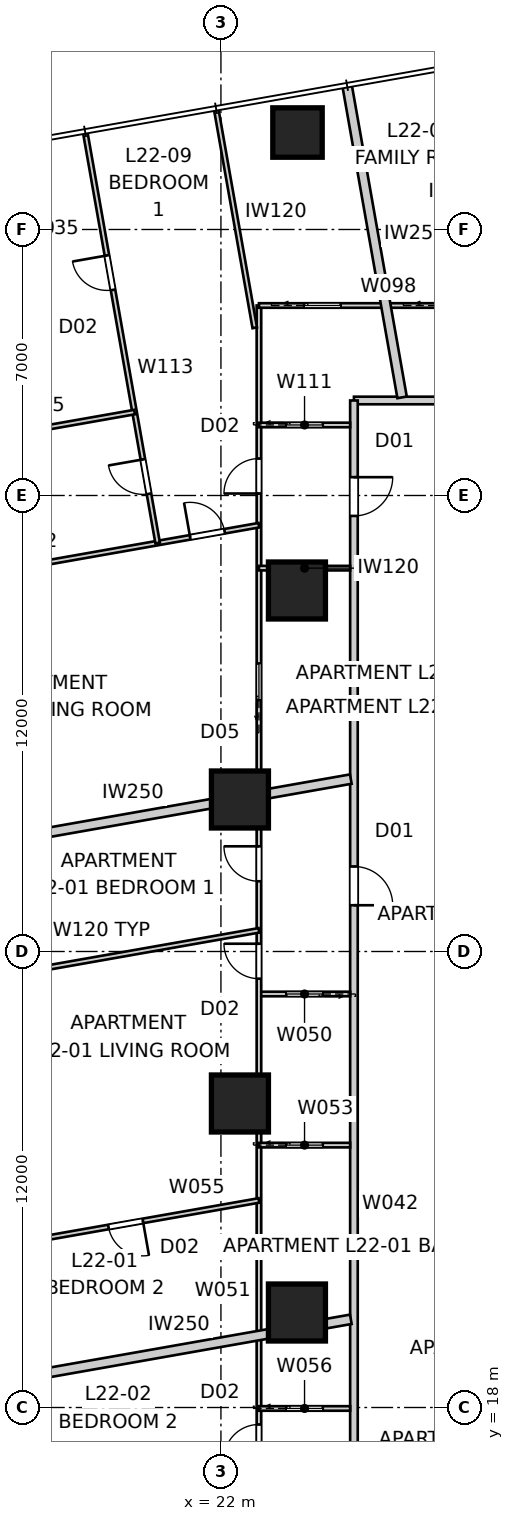
"""IFC4 building model, lengths in metres.
Left out: names, types, materials, properties, quantities, classifications, styles, units other than length and angle.
Written with IfcOpenShell. Run it as: python <this file> out.ifc"""

import sys

from ifc_helpers import new_model, si_unit, direction, frame, frame_2d, origin, origin_2d, place, context, subcontext, project, spatial, rectangle, extrude, element, fill, save


model = new_model("IFC4")
c1 = context("Model", 3, precision=1e-05, world=origin(), true_north=direction((0.0, 1.0)))
c2 = subcontext(c1, "Body", "Model", "MODEL_VIEW")
j1 = project(units=[si_unit("LENGTHUNIT", "METRE"), si_unit("PLANEANGLEUNIT", "RADIAN")], contexts=[c1])
p1 = place(None, origin())
s1 = spatial("IfcSite", under=j1, at=p1, CompositionType="ELEMENT")
p2 = place(p1, origin())
s2 = spatial("IfcBuilding", under=s1, at=p2, CompositionType="ELEMENT")
p3 = place(p2, frame((0.0, 0.0, 82.8)))
s3 = spatial("IfcBuildingStorey", under=s2, at=p3, CompositionType="ELEMENT", Elevation=82.8)
p4 = place(p3, frame((24.015, 51.552, 0.0), z_axis=(0.0, 0.0, 1.0), x_axis=(1.0, 0.0, 0.0)))
e1 = element("IfcColumn", 1, at=p4, inside=s3, PredefinedType="COLUMN", context=c2, shape_type="SweptSolid", body=[
    extrude(rectangle(XDim=1.3, YDim=1.3, at=origin_2d()), origin(), (0.0, 0.0, 1.0), 3.4),
])
for number, where, z_axis, x_axis in (
    (2, (24.0, 39.5, 0.0), (0.0, 0.0, 1.0), (1.0, 0.0, 0.0)),
    (3, (22.5, 34.0, 0.0), (0.0, 0.0, 1.0), (1.0, 0.0, 0.0)),
    (4, (22.5, 26.0, 0.0), (0.0, 0.0, 1.0), (1.0, 0.0, 0.0)),
    (5, (24.0, 20.5, 0.0), (0.0, 0.0, 1.0), (1.0, 0.0, 0.0)),
):
    element("IfcColumn", number, at=place(p3, frame(where, z_axis=z_axis, x_axis=x_axis)), inside=s3, PredefinedType="COLUMN", context=c2, shape_type="SweptSolid", body=[
        extrude(rectangle(XDim=1.5, YDim=1.5, at=origin_2d()), origin(), (0.0, 0.0, 1.0), 3.4),
    ])
p5 = place(p3, frame((54.5, 44.5, 0.0), z_axis=(0.0, 0.0, 1.0), x_axis=(-1.0, 0.0, 0.0)))
e6 = element("IfcWall", 6, at=p5, inside=s3, PredefinedType="PARTITIONING", context=c2, shape_type="SweptSolid", body=[
    extrude(rectangle(XDim=29.0, YDim=0.2, at=frame_2d((14.5, 0.0))), origin(), (0.0, 0.0, 1.0), 3.25),
])
p6 = place(p5, frame((10.129, 0.0, 0.0)))
e7 = element("IfcOpeningElement", 7, at=p6, cuts=e6, PredefinedType="OPENING", context=c2, shape_type="SweptSolid", body=[
    extrude(rectangle(XDim=1.02, YDim=2.34, at=frame_2d((0.51, 1.17))), frame((0.0, 0.11, 0.0), z_axis=(0.0, -1.0, 0.0), x_axis=(1.0, 0.0, 0.0)), (0.0, 0.0, 1.0), 0.22),
])
p7 = place(p5, frame((3.065, 0.0, 0.0)))
e8 = element("IfcOpeningElement", 8, at=p7, cuts=e6, PredefinedType="OPENING", context=c2, shape_type="SweptSolid", body=[
    extrude(rectangle(XDim=1.02, YDim=2.1, at=frame_2d((0.51, 1.05))), frame((0.0, 0.11, 0.0), z_axis=(0.0, -1.0, 0.0), x_axis=(1.0, 0.0, 0.0)), (0.0, 0.0, 1.0), 0.22),
])
p8 = place(p3, frame((25.5, 44.5, 0.0), z_axis=(0.0, 0.0, 1.0), x_axis=(0.0, -1.0, 0.0)))
e9 = element("IfcWall", 9, at=p8, inside=s3, PredefinedType="PARTITIONING", context=c2, shape_type="SweptSolid", body=[
    extrude(rectangle(XDim=29.0, YDim=0.2, at=frame_2d((14.5, 0.0))), origin(), (0.0, 0.0, 1.0), 3.25),
])
p9 = place(p8, frame((12.263, 0.0, 0.0)))
e10 = element("IfcOpeningElement", 10, at=p9, cuts=e9, PredefinedType="OPENING", context=c2, shape_type="SweptSolid", body=[
    extrude(rectangle(XDim=1.02, YDim=2.34, at=frame_2d((0.51, 1.17))), frame((0.0, 0.11, 0.0), z_axis=(0.0, -1.0, 0.0), x_axis=(1.0, 0.0, 0.0)), (0.0, 0.0, 1.0), 0.22),
])
p10 = place(p8, frame((2.018, 0.0, 0.0)))
e11 = element("IfcOpeningElement", 11, at=p10, cuts=e9, PredefinedType="OPENING", context=c2, shape_type="SweptSolid", body=[
    extrude(rectangle(XDim=1.02, YDim=2.34, at=frame_2d((0.51, 1.17))), frame((0.0, 0.11, 0.0), z_axis=(0.0, -1.0, 0.0), x_axis=(1.0, 0.0, 0.0)), (0.0, 0.0, 1.0), 0.22),
])
p11 = place(p3, frame((25.318, 52.797, 0.0), z_axis=(0.0, 0.0, 1.0), x_axis=(0.173651756605, -0.984807121942, 0.0)))
e12 = element("IfcWall", 12, at=p11, inside=s3, PredefinedType="PARTITIONING", context=c2, shape_type="SweptSolid", body=[
    extrude(rectangle(XDim=8.341, YDim=0.25, at=frame_2d((4.171, 0.0))), origin(), (0.0, 0.0, 1.0), 3.25),
])
p12 = place(p3, frame((14.164, 32.552, 0.0), z_axis=(0.0, 0.0, 1.0), x_axis=(0.98481000304, 0.173635416642, 0.0)))
e13 = element("IfcWall", 13, at=p12, inside=s3, PredefinedType="PARTITIONING", context=c2, shape_type="SweptSolid", body=[
    extrude(rectangle(XDim=11.427, YDim=0.25, at=frame_2d((5.713, 0.0))), origin(), (0.0, 0.0, 1.0), 3.25),
])
p13 = place(p3, frame((16.595, 18.765, 0.0), z_axis=(0.0, 0.0, 1.0), x_axis=(0.984806596137, 0.173654738504, 0.0)))
e14 = element("IfcWall", 14, at=p13, inside=s3, PredefinedType="PARTITIONING", context=c2, shape_type="SweptSolid", body=[
    extrude(rectangle(XDim=8.958, YDim=0.25, at=frame_2d((4.479, 0.0))), origin(), (0.0, 0.0, 1.0), 3.25),
])
p14 = place(p3, frame((25.4, 28.882, 0.0), z_axis=(0.0, 0.0, 1.0), x_axis=(-1.0, 0.0, 0.0)))
e15 = element("IfcWall", 15, at=p14, inside=s3, PredefinedType="PARTITIONING", context=c2, shape_type="SweptSolid", body=[
    extrude(rectangle(XDim=2.4, YDim=0.12, at=frame_2d((1.2, 0.0))), origin(), (0.0, 0.0, 1.0), 3.25),
])
p15 = place(p14, frame((0.72, 0.0, 0.0)))
e16 = element("IfcOpeningElement", 16, at=p15, cuts=e15, PredefinedType="OPENING", context=c2, shape_type="SweptSolid", body=[
    extrude(rectangle(XDim=0.96, YDim=2.1, at=frame_2d((0.48, 1.05))), frame((0.0, 0.07, 0.0), z_axis=(0.0, -1.0, 0.0), x_axis=(1.0, 0.0, 0.0)), (0.0, 0.0, 1.0), 0.14),
])
p16 = place(p3, frame((23.0, 13.0, 0.0), z_axis=(0.0, 0.0, 1.0), x_axis=(0.0, 1.0, 0.0)))
e17 = element("IfcWall", 17, at=p16, inside=s3, PredefinedType="PARTITIONING", context=c2, shape_type="SweptSolid", body=[
    extrude(rectangle(XDim=34.0, YDim=0.12, at=frame_2d((17.0, 0.0))), origin(), (0.0, 0.0, 1.0), 2.55),
])
p17 = place(p16, frame((18.848, 0.0, 0.0)))
e18 = element("IfcOpeningElement", 18, at=p17, cuts=e17, PredefinedType="OPENING", context=c2, shape_type="SweptSolid", body=[
    extrude(rectangle(XDim=0.92, YDim=2.34, at=frame_2d((0.46, 1.17))), frame((0.0, 0.07, 0.0), z_axis=(0.0, -1.0, 0.0), x_axis=(1.0, 0.0, 0.0)), (0.0, 0.0, 1.0), 0.14),
])
p18 = place(p16, frame((16.284, 0.0, 0.0)))
e19 = element("IfcOpeningElement", 19, at=p18, cuts=e17, PredefinedType="OPENING", context=c2, shape_type="SweptSolid", body=[
    extrude(rectangle(XDim=0.92, YDim=2.34, at=frame_2d((0.46, 1.17))), frame((0.0, 0.07, 0.0), z_axis=(0.0, -1.0, 0.0), x_axis=(1.0, 0.0, 0.0)), (0.0, 0.0, 1.0), 0.14),
])
p19 = place(p16, frame((29.052, 0.0, 0.0)))
e20 = element("IfcOpeningElement", 20, at=p19, cuts=e17, PredefinedType="OPENING", context=c2, shape_type="SweptSolid", body=[
    extrude(rectangle(XDim=0.92, YDim=2.34, at=frame_2d((0.46, 1.17))), frame((0.0, 0.07, 0.0), z_axis=(0.0, -1.0, 0.0), x_axis=(1.0, 0.0, 0.0)), (0.0, 0.0, 1.0), 0.14),
])
p20 = place(p16, frame((1.196, 0.0, 0.0)))
e21 = element("IfcOpeningElement", 21, at=p20, cuts=e17, PredefinedType="OPENING", context=c2, shape_type="SweptSolid", body=[
    extrude(rectangle(XDim=0.92, YDim=2.34, at=frame_2d((0.46, 1.17))), frame((0.0, 0.07, 0.0), z_axis=(0.0, -1.0, 0.0), x_axis=(1.0, 0.0, 0.0)), (0.0, 0.0, 1.0), 0.14),
])
p21 = place(p16, frame((3.633, 0.0, 0.0)))
e22 = element("IfcOpeningElement", 22, at=p21, cuts=e17, PredefinedType="OPENING", context=c2, shape_type="SweptSolid", body=[
    extrude(rectangle(XDim=0.92, YDim=2.34, at=frame_2d((0.46, 1.17))), frame((0.0, 0.07, 0.0), z_axis=(0.0, -1.0, 0.0), x_axis=(1.0, 0.0, 0.0)), (0.0, 0.0, 1.0), 0.14),
])
p22 = place(p16, frame((23.619, 0.0, 0.0)))
e23 = element("IfcOpeningElement", 23, at=p22, cuts=e17, PredefinedType="OPENING", context=c2, shape_type="SweptSolid", body=[
    extrude(rectangle(XDim=0.96, YDim=2.1, at=frame_2d((0.48, 1.05))), frame((0.0, 0.07, 0.0), z_axis=(0.0, -1.0, 0.0), x_axis=(1.0, 0.0, 0.0)), (0.0, 0.0, 1.0), 0.14),
])
p23 = place(p3, frame((23.0, 24.905, 0.0), z_axis=(0.0, 0.0, 1.0), x_axis=(1.0, 0.0, 0.0)))
e24 = element("IfcWall", 24, at=p23, inside=s3, PredefinedType="PARTITIONING", context=c2, shape_type="SweptSolid", body=[
    extrude(rectangle(XDim=2.4, YDim=0.12, at=frame_2d((1.2, 0.0))), origin(), (0.0, 0.0, 1.0), 3.25),
])
p24 = place(p23, frame((0.72, 0.0, 0.0)))
e25 = element("IfcOpeningElement", 25, at=p24, cuts=e24, PredefinedType="OPENING", context=c2, shape_type="SweptSolid", body=[
    extrude(rectangle(XDim=0.96, YDim=2.1, at=frame_2d((0.48, 1.05))), frame((0.0, 0.07, 0.0), z_axis=(0.0, -1.0, 0.0), x_axis=(1.0, 0.0, 0.0)), (0.0, 0.0, 1.0), 0.14),
])
p25 = place(p3, frame((14.812, 29.113, 0.0), z_axis=(0.0, 0.0, 1.0), x_axis=(0.984807787824, 0.173647980238, 0.0)))
e26 = element("IfcWall", 26, at=p25, inside=s3, PredefinedType="PARTITIONING", context=c2, shape_type="SweptSolid", body=[
    extrude(rectangle(XDim=8.315, YDim=0.12, at=frame_2d((4.157, 0.0))), origin(), (0.0, 0.0, 1.0), 3.25),
])
p26 = place(p3, frame((23.0, 23.448, 0.0), z_axis=(0.0, 0.0, 1.0), x_axis=(-0.984809234282, -0.173639776761, 0.0)))
e27 = element("IfcWall", 27, at=p26, inside=s3, PredefinedType="PARTITIONING", context=c2, shape_type="SweptSolid", body=[
    extrude(rectangle(XDim=7.081, YDim=0.12, at=frame_2d((3.541, 0.0))), origin(), (0.0, 0.0, 1.0), 3.25),
])
p27 = place(p26, frame((3.1, 0.0, 0.0)))
e28 = element("IfcOpeningElement", 28, at=p27, cuts=e27, PredefinedType="OPENING", context=c2, shape_type="SweptSolid", body=[
    extrude(rectangle(XDim=0.92, YDim=2.34, at=frame_2d((0.46, 1.17))), frame((0.0, 0.07, 0.0), z_axis=(0.0, -1.0, 0.0), x_axis=(1.0, 0.0, 0.0)), (0.0, 0.0, 1.0), 0.14),
])
p28 = place(p3, frame((23.0, 17.975, 0.0), z_axis=(0.0, 0.0, 1.0), x_axis=(1.0, 0.0, 0.0)))
e29 = element("IfcWall", 29, at=p28, inside=s3, PredefinedType="PARTITIONING", context=c2, shape_type="SweptSolid", body=[
    extrude(rectangle(XDim=2.4, YDim=0.12, at=frame_2d((1.2, 0.0))), origin(), (0.0, 0.0, 1.0), 3.25),
])
p29 = place(p28, frame((0.72, 0.0, 0.0)))
e30 = element("IfcOpeningElement", 30, at=p29, cuts=e29, PredefinedType="OPENING", context=c2, shape_type="SweptSolid", body=[
    extrude(rectangle(XDim=0.96, YDim=2.1, at=frame_2d((0.48, 1.05))), frame((0.0, 0.07, 0.0), z_axis=(0.0, -1.0, 0.0), x_axis=(1.0, 0.0, 0.0)), (0.0, 0.0, 1.0), 0.14),
])
p30 = place(p3, frame((23.0, 47.0, 0.0), z_axis=(0.0, 0.0, 1.0), x_axis=(1.0, 0.0, 0.0)))
e31 = element("IfcWall", 31, at=p30, inside=s3, PredefinedType="PARTITIONING", context=c2, shape_type="SweptSolid", body=[
    extrude(rectangle(XDim=24.771, YDim=0.12, at=frame_2d((12.386, 0.0))), origin(), (0.0, 0.0, 1.0), 2.55),
])
p31 = place(p30, frame((21.825, 0.0, 0.0)))
e32 = element("IfcOpeningElement", 32, at=p31, cuts=e31, PredefinedType="OPENING", context=c2, shape_type="SweptSolid", body=[
    extrude(rectangle(XDim=0.92, YDim=2.34, at=frame_2d((0.46, 1.17))), frame((0.0, 0.07, 0.0), z_axis=(0.0, -1.0, 0.0), x_axis=(1.0, 0.0, 0.0)), (0.0, 0.0, 1.0), 0.14),
])
p32 = place(p30, frame((11.135, 0.0, 0.0)))
e33 = element("IfcOpeningElement", 33, at=p32, cuts=e31, PredefinedType="OPENING", context=c2, shape_type="SweptSolid", body=[
    extrude(rectangle(XDim=0.96, YDim=2.1, at=frame_2d((0.48, 1.05))), frame((0.0, 0.07, 0.0), z_axis=(0.0, -1.0, 0.0), x_axis=(1.0, 0.0, 0.0)), (0.0, 0.0, 1.0), 0.14),
])
p33 = place(p30, frame((1.19, 0.0, 0.0)))
e34 = element("IfcOpeningElement", 34, at=p33, cuts=e31, PredefinedType="OPENING", context=c2, shape_type="SweptSolid", body=[
    extrude(rectangle(XDim=0.96, YDim=2.1, at=frame_2d((0.48, 1.05))), frame((0.0, 0.07, 0.0), z_axis=(0.0, -1.0, 0.0), x_axis=(1.0, 0.0, 0.0)), (0.0, 0.0, 1.0), 0.14),
])
p34 = place(p30, frame((8.342, 0.0, 0.0)))
e35 = element("IfcOpeningElement", 35, at=p34, cuts=e31, PredefinedType="OPENING", context=c2, shape_type="SweptSolid", body=[
    extrude(rectangle(XDim=0.96, YDim=2.1, at=frame_2d((0.48, 1.05))), frame((0.0, 0.07, 0.0), z_axis=(0.0, -1.0, 0.0), x_axis=(1.0, 0.0, 0.0)), (0.0, 0.0, 1.0), 0.14),
])
p35 = place(p30, frame((4.663, 0.0, 0.0)))
e36 = element("IfcOpeningElement", 36, at=p35, cuts=e31, PredefinedType="OPENING", context=c2, shape_type="SweptSolid", body=[
    extrude(rectangle(XDim=0.96, YDim=2.1, at=frame_2d((0.48, 1.05))), frame((0.0, 0.07, 0.0), z_axis=(0.0, -1.0, 0.0), x_axis=(1.0, 0.0, 0.0)), (0.0, 0.0, 1.0), 0.14),
])
p36 = place(p3, frame((25.4, 40.088, 0.0), z_axis=(0.0, 0.0, 1.0), x_axis=(-1.0, 0.0, 0.0)))
e37 = element("IfcWall", 37, at=p36, inside=s3, PredefinedType="PARTITIONING", context=c2, shape_type="SweptSolid", body=[
    extrude(rectangle(XDim=2.4, YDim=0.12, at=frame_2d((1.2, 0.0))), origin(), (0.0, 0.0, 1.0), 3.25),
])
p37 = place(p3, frame((23.0, 43.856, 0.0), z_axis=(0.0, 0.0, 1.0), x_axis=(1.0, 0.0, 0.0)))
e38 = element("IfcWall", 38, at=p37, inside=s3, PredefinedType="PARTITIONING", context=c2, shape_type="SweptSolid", body=[
    extrude(rectangle(XDim=2.4, YDim=0.12, at=frame_2d((1.2, 0.0))), origin(), (0.0, 0.0, 1.0), 3.25),
])
p38 = place(p37, frame((0.72, 0.0, 0.0)))
e39 = element("IfcOpeningElement", 39, at=p38, cuts=e38, PredefinedType="OPENING", context=c2, shape_type="SweptSolid", body=[
    extrude(rectangle(XDim=0.96, YDim=2.1, at=frame_2d((0.48, 1.05))), frame((0.0, 0.07, 0.0), z_axis=(0.0, -1.0, 0.0), x_axis=(1.0, 0.0, 0.0)), (0.0, 0.0, 1.0), 0.14),
])
p39 = place(p3, frame((12.988, 39.453, 0.0), z_axis=(0.0, 0.0, 1.0), x_axis=(0.984807724889, 0.173648337162, 0.0)))
e40 = element("IfcWall", 40, at=p39, inside=s3, PredefinedType="PARTITIONING", context=c2, shape_type="SweptSolid", body=[
    extrude(rectangle(XDim=10.167, YDim=0.12, at=frame_2d((5.083, 0.0))), origin(), (0.0, 0.0, 1.0), 2.638),
])
p40 = place(p39, frame((8.328, 0.0, 0.0)))
e41 = element("IfcOpeningElement", 41, at=p40, cuts=e40, PredefinedType="OPENING", context=c2, shape_type="SweptSolid", body=[
    extrude(rectangle(XDim=0.92, YDim=2.34, at=frame_2d((0.46, 1.17))), frame((0.0, 0.07, 0.0), z_axis=(0.0, -1.0, 0.0), x_axis=(1.0, 0.0, 0.0)), (0.0, 0.0, 1.0), 0.14),
])
p41 = place(p3, frame((20.335, 40.749, 0.0), z_axis=(0.0, 0.0, 1.0), x_axis=(-0.173639194339, 0.984809336973, 0.0)))
e42 = element("IfcWall", 42, at=p41, inside=s3, PredefinedType="PARTITIONING", context=c2, shape_type="SweptSolid", body=[
    extrude(rectangle(XDim=10.96, YDim=0.12, at=frame_2d((5.48, 0.0))), origin(), (0.0, 0.0, 1.0), 3.25),
])
p42 = place(p41, frame((6.765, 0.0, 0.0)))
e43 = element("IfcOpeningElement", 43, at=p42, cuts=e42, PredefinedType="OPENING", context=c2, shape_type="SweptSolid", body=[
    extrude(rectangle(XDim=0.92, YDim=2.34, at=frame_2d((0.46, 1.17))), frame((0.0, 0.07, 0.0), z_axis=(0.0, -1.0, 0.0), x_axis=(1.0, 0.0, 0.0)), (0.0, 0.0, 1.0), 0.14),
])
p43 = place(p41, frame((1.315, 0.0, 0.0)))
e44 = element("IfcOpeningElement", 44, at=p43, cuts=e42, PredefinedType="OPENING", context=c2, shape_type="SweptSolid", body=[
    extrude(rectangle(XDim=0.92, YDim=2.34, at=frame_2d((0.46, 1.17))), frame((0.0, 0.07, 0.0), z_axis=(0.0, -1.0, 0.0), x_axis=(1.0, 0.0, 0.0)), (0.0, 0.0, 1.0), 0.14),
])
p44 = place(p3, frame((21.878, 52.15, 0.0), z_axis=(0.0, 0.0, 1.0), x_axis=(0.173634707655, -0.984810128044, 0.0)))
e45 = element("IfcWall", 45, at=p44, inside=s3, PredefinedType="PARTITIONING", context=c2, shape_type="SweptSolid", body=[
    extrude(rectangle(XDim=5.825, YDim=0.12, at=frame_2d((2.913, 0.0))), origin(), (0.0, 0.0, 1.0), 2.638),
])
p45 = place(p3, frame((12.38, 42.9, 0.0), z_axis=(0.0, 0.0, 1.0), x_axis=(0.984807929323, 0.173647177755, 0.0)))
e46 = element("IfcWall", 46, at=p45, inside=s3, PredefinedType="PARTITIONING", context=c2, shape_type="SweptSolid", body=[
    extrude(rectangle(XDim=7.46, YDim=0.12, at=frame_2d((3.73, 0.0))), origin(), (0.0, 0.0, 1.0), 3.25),
])
p46 = place(p45, frame((1.525, 0.0, 0.0)))
e47 = element("IfcOpeningElement", 47, at=p46, cuts=e46, PredefinedType="OPENING", context=c2, shape_type="SweptSolid", body=[
    extrude(rectangle(XDim=0.92, YDim=2.34, at=frame_2d((0.46, 1.17))), frame((0.0, 0.07, 0.0), z_axis=(0.0, -1.0, 0.0), x_axis=(1.0, 0.0, 0.0)), (0.0, 0.0, 1.0), 0.14),
])
p47 = place(p9, origin())
e48 = element("IfcDoor", 48, at=p47, inside=s3, OperationType="SINGLE_SWING_RIGHT", PredefinedType="DOOR", context=c2, shape_type="SweptSolid", body=[
    extrude(rectangle(XDim=1.02, YDim=2.34, at=frame_2d((0.51, 1.17))), frame((0.0, 0.025, 0.0), z_axis=(0.0, -1.0, 0.0), x_axis=(1.0, 0.0, 0.0)), (0.0, 0.0, 1.0), 0.05),
])
fill(e10, e48)
p48 = place(p10, origin())
e49 = element("IfcDoor", 49, at=p48, inside=s3, OperationType="SINGLE_SWING_LEFT", PredefinedType="DOOR", context=c2, shape_type="SweptSolid", body=[
    extrude(rectangle(XDim=1.02, YDim=2.34, at=frame_2d((0.51, 1.17))), frame((0.0, 0.025, 0.0), z_axis=(0.0, -1.0, 0.0), x_axis=(1.0, 0.0, 0.0)), (0.0, 0.0, 1.0), 0.05),
])
fill(e11, e49)
p49 = place(p17, origin())
e50 = element("IfcDoor", 50, at=p49, inside=s3, OperationType="SINGLE_SWING_RIGHT", PredefinedType="DOOR", context=c2, shape_type="SweptSolid", body=[
    extrude(rectangle(XDim=0.92, YDim=2.34, at=frame_2d((0.46, 1.17))), frame((0.0, 0.025, 0.0), z_axis=(0.0, -1.0, 0.0), x_axis=(1.0, 0.0, 0.0)), (0.0, 0.0, 1.0), 0.05),
])
fill(e18, e50)
p50 = place(p15, origin())
e51 = element("IfcDoor", 51, at=p50, inside=s3, OperationType="SLIDING_TO_LEFT", PredefinedType="DOOR", context=c2, shape_type="SweptSolid", body=[
    extrude(rectangle(XDim=0.96, YDim=2.1, at=frame_2d((0.48, 1.05))), frame((0.0, 0.025, 0.0), z_axis=(0.0, -1.0, 0.0), x_axis=(1.0, 0.0, 0.0)), (0.0, 0.0, 1.0), 0.05),
])
fill(e16, e51)
p51 = place(p18, origin())
e52 = element("IfcDoor", 52, at=p51, inside=s3, OperationType="SINGLE_SWING_RIGHT", PredefinedType="DOOR", context=c2, shape_type="SweptSolid", body=[
    extrude(rectangle(XDim=0.92, YDim=2.34, at=frame_2d((0.46, 1.17))), frame((0.0, 0.025, 0.0), z_axis=(0.0, -1.0, 0.0), x_axis=(1.0, 0.0, 0.0)), (0.0, 0.0, 1.0), 0.05),
])
fill(e19, e52)
p52 = place(p19, origin())
e53 = element("IfcDoor", 53, at=p52, inside=s3, OperationType="SINGLE_SWING_LEFT", PredefinedType="DOOR", context=c2, shape_type="SweptSolid", body=[
    extrude(rectangle(XDim=0.92, YDim=2.34, at=frame_2d((0.46, 1.17))), frame((0.0, 0.025, 0.0), z_axis=(0.0, -1.0, 0.0), x_axis=(1.0, 0.0, 0.0)), (0.0, 0.0, 1.0), 0.05),
])
fill(e20, e53)
p53 = place(p38, origin())
e54 = element("IfcDoor", 54, at=p53, inside=s3, OperationType="SLIDING_TO_LEFT", PredefinedType="DOOR", context=c2, shape_type="SweptSolid", body=[
    extrude(rectangle(XDim=0.96, YDim=2.1, at=frame_2d((0.48, 1.05))), frame((0.0, 0.025, 0.0), z_axis=(0.0, -1.0, 0.0), x_axis=(1.0, 0.0, 0.0)), (0.0, 0.0, 1.0), 0.05),
])
fill(e39, e54)
p54 = place(p29, origin())
e55 = element("IfcDoor", 55, at=p54, inside=s3, OperationType="SLIDING_TO_LEFT", PredefinedType="DOOR", context=c2, shape_type="SweptSolid", body=[
    extrude(rectangle(XDim=0.96, YDim=2.1, at=frame_2d((0.48, 1.05))), frame((0.0, 0.025, 0.0), z_axis=(0.0, -1.0, 0.0), x_axis=(1.0, 0.0, 0.0)), (0.0, 0.0, 1.0), 0.05),
])
fill(e30, e55)
p55 = place(p21, origin())
e56 = element("IfcDoor", 56, at=p55, inside=s3, OperationType="SINGLE_SWING_LEFT", PredefinedType="DOOR", context=c2, shape_type="SweptSolid", body=[
    extrude(rectangle(XDim=0.92, YDim=2.34, at=frame_2d((0.46, 1.17))), frame((0.0, 0.025, 0.0), z_axis=(0.0, -1.0, 0.0), x_axis=(1.0, 0.0, 0.0)), (0.0, 0.0, 1.0), 0.05),
])
fill(e22, e56)
p56 = place(p24, origin())
e57 = element("IfcDoor", 57, at=p56, inside=s3, OperationType="SLIDING_TO_LEFT", PredefinedType="DOOR", context=c2, shape_type="SweptSolid", body=[
    extrude(rectangle(XDim=0.96, YDim=2.1, at=frame_2d((0.48, 1.05))), frame((0.0, 0.025, 0.0), z_axis=(0.0, -1.0, 0.0), x_axis=(1.0, 0.0, 0.0)), (0.0, 0.0, 1.0), 0.05),
])
fill(e25, e57)
p57 = place(p27, origin())
e58 = element("IfcDoor", 58, at=p57, inside=s3, OperationType="SINGLE_SWING_LEFT", PredefinedType="DOOR", context=c2, shape_type="SweptSolid", body=[
    extrude(rectangle(XDim=0.92, YDim=2.34, at=frame_2d((0.46, 1.17))), frame((0.0, 0.025, 0.0), z_axis=(0.0, -1.0, 0.0), x_axis=(1.0, 0.0, 0.0)), (0.0, 0.0, 1.0), 0.05),
])
fill(e28, e58)
p58 = place(p33, origin())
e59 = element("IfcDoor", 59, at=p58, inside=s3, OperationType="SLIDING_TO_LEFT", PredefinedType="DOOR", context=c2, shape_type="SweptSolid", body=[
    extrude(rectangle(XDim=0.96, YDim=2.1, at=frame_2d((0.48, 1.05))), frame((0.0, 0.025, 0.0), z_axis=(0.0, -1.0, 0.0), x_axis=(1.0, 0.0, 0.0)), (0.0, 0.0, 1.0), 0.05),
])
fill(e34, e59)
p59 = place(p42, origin())
e60 = element("IfcDoor", 60, at=p59, inside=s3, OperationType="SINGLE_SWING_RIGHT", PredefinedType="DOOR", context=c2, shape_type="SweptSolid", body=[
    extrude(rectangle(XDim=0.92, YDim=2.34, at=frame_2d((0.46, 1.17))), frame((0.0, 0.025, 0.0), z_axis=(0.0, -1.0, 0.0), x_axis=(1.0, 0.0, 0.0)), (0.0, 0.0, 1.0), 0.05),
])
fill(e43, e60)
p60 = place(p43, origin())
e61 = element("IfcDoor", 61, at=p60, inside=s3, OperationType="SINGLE_SWING_RIGHT", PredefinedType="DOOR", context=c2, shape_type="SweptSolid", body=[
    extrude(rectangle(XDim=0.92, YDim=2.34, at=frame_2d((0.46, 1.17))), frame((0.0, 0.025, 0.0), z_axis=(0.0, -1.0, 0.0), x_axis=(1.0, 0.0, 0.0)), (0.0, 0.0, 1.0), 0.05),
])
fill(e44, e61)
p61 = place(p40, origin())
e62 = element("IfcDoor", 62, at=p61, inside=s3, OperationType="SINGLE_SWING_LEFT", PredefinedType="DOOR", context=c2, shape_type="SweptSolid", body=[
    extrude(rectangle(XDim=0.92, YDim=2.34, at=frame_2d((0.46, 1.17))), frame((0.0, 0.025, 0.0), z_axis=(0.0, -1.0, 0.0), x_axis=(1.0, 0.0, 0.0)), (0.0, 0.0, 1.0), 0.05),
])
fill(e41, e62)
p62 = place(p22, origin())
e63 = element("IfcDoor", 63, at=p62, inside=s3, OperationType="SLIDING_TO_LEFT", PredefinedType="DOOR", context=c2, shape_type="SweptSolid", body=[
    extrude(rectangle(XDim=0.96, YDim=2.1, at=frame_2d((0.48, 1.05))), frame((0.0, 0.025, 0.0), z_axis=(0.0, -1.0, 0.0), x_axis=(1.0, 0.0, 0.0)), (0.0, 0.0, 1.0), 0.05),
])
fill(e23, e63)
save(model, sys.argv[1])
